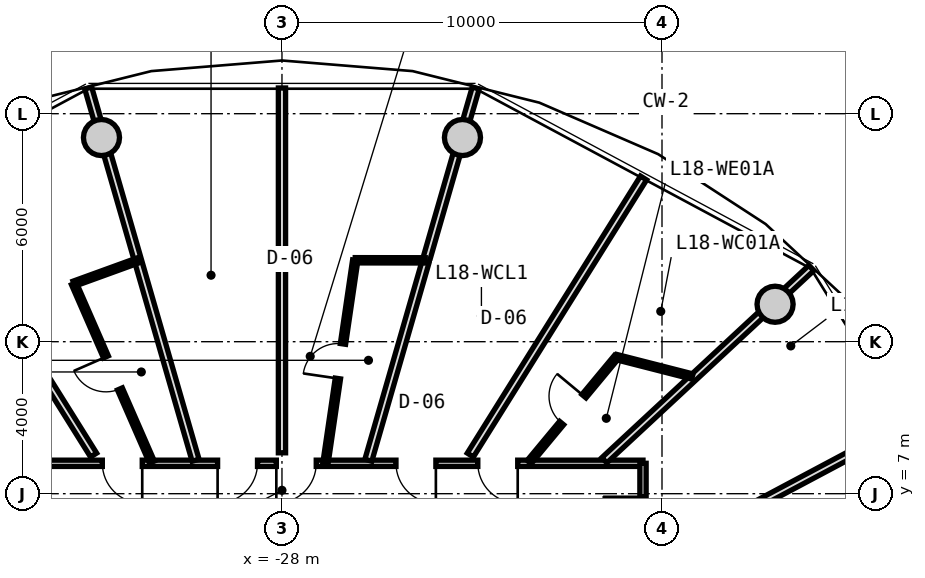
"""IFC4 building model, lengths in metres.
Left out: names, types, materials, properties, quantities, classifications, styles, units other than length and angle.
Written with IfcOpenShell. Run it as: python <this file> out.ifc"""

import sys

from ifc_helpers import new_model, si_unit, direction, frame, frame_2d, origin, origin_2d, place, context, subcontext, project, spatial, rectangle, circle, extrude, source, transform, mapped, element, fill, save


model = new_model("IFC4")
c1 = context("Model", 3, precision=1e-05, world=origin(), true_north=direction((0.0, 1.0)))
c2 = subcontext(c1, "Body", "Model", "MODEL_VIEW")
j1 = project(units=[si_unit("LENGTHUNIT", "METRE"), si_unit("PLANEANGLEUNIT", "RADIAN")], contexts=[c1])
p1 = place(None, origin())
s1 = spatial("IfcSite", under=j1, at=p1, CompositionType="ELEMENT")
p2 = place(p1, origin())
s2 = spatial("IfcBuilding", under=s1, at=p2, CompositionType="ELEMENT")
p3 = place(p2, frame((0.0, 0.0, 61.25)))
s3 = spatial("IfcBuildingStorey", under=s2, at=p3, CompositionType="ELEMENT", Elevation=61.25)
m1 = source(origin(), c2, "Body", "SweptSolid", [
    extrude(circle(Radius=0.475, at=origin_2d()), origin(), (0.0, 0.0, 1.0), 3.05),
])
for number, where, z_axis, x_axis in (
    (1, (-15.025, 11.985, 0.0), (0.0, 0.0, 1.0), (1.0, 0.0, 0.0)),
    (2, (-23.251, 16.373, 0.0), (0.0, 0.0, 1.0), (1.0, 0.0, 0.0)),
    (3, (-32.749, 16.373, 0.0), (0.0, 0.0, 1.0), (1.0, 0.0, 0.0)),
):
    element("IfcColumn", number, at=place(p3, frame(where, z_axis=z_axis, x_axis=x_axis)), inside=s3, PredefinedType="COLUMN", context=c2, shape_type="MappedRepresentation", body=[
        mapped(m1, transform((0.0, 0.0, 0.0), x_axis=(1.0, 0.0, 0.0), y_axis=(0.0, 1.0, 0.0), z_axis=(0.0, 0.0, 1.0), scale=1.0)),
    ])
m2 = source(origin(), c2, "Body", "SweptSolid", [
    extrude(rectangle(XDim=19.0, YDim=0.165, at=frame_2d((9.5, 0.0))), origin(), (0.0, 0.0, 1.0), 2.775),
])
p4 = place(p3, frame((-37.5, 7.8, 0.0), z_axis=(0.0, 0.0, 1.0), x_axis=(1.0, 0.0, 0.0)))
e4 = element("IfcWall", 4, at=p4, inside=s3, PredefinedType="PARTITIONING", context=c2, shape_type="MappedRepresentation", body=[
    mapped(m2, transform((0.0, 0.0, 0.0), x_axis=(1.0, 0.0, 0.0), y_axis=(0.0, 1.0, 0.0), z_axis=(0.0, 0.0, 1.0), scale=1.0)),
])
p5 = place(p4, frame((14.653, 0.0, 0.0)))
e5 = element("IfcOpeningElement", 5, at=p5, cuts=e4, PredefinedType="OPENING", context=c2, shape_type="SweptSolid", body=[
    extrude(rectangle(XDim=1.05, YDim=2.15, at=frame_2d((0.525, 1.075))), frame((0.0, 0.093, 0.0), z_axis=(0.0, -1.0, 0.0), x_axis=(1.0, 0.0, 0.0)), (0.0, 0.0, 1.0), 0.185),
])
p6 = place(p4, frame((12.5, 0.0, 0.0)))
e6 = element("IfcOpeningElement", 6, at=p6, cuts=e4, PredefinedType="OPENING", context=c2, shape_type="SweptSolid", body=[
    extrude(rectangle(XDim=1.05, YDim=2.15, at=frame_2d((0.525, 1.075))), frame((0.0, 0.093, 0.0), z_axis=(0.0, -1.0, 0.0), x_axis=(1.0, 0.0, 0.0)), (0.0, 0.0, 1.0), 0.185),
])
p7 = place(p4, frame((9.352, 0.0, 0.0)))
e7 = element("IfcOpeningElement", 7, at=p7, cuts=e4, PredefinedType="OPENING", context=c2, shape_type="SweptSolid", body=[
    extrude(rectangle(XDim=1.05, YDim=2.15, at=frame_2d((0.525, 1.075))), frame((0.0, 0.093, 0.0), z_axis=(0.0, -1.0, 0.0), x_axis=(1.0, 0.0, 0.0)), (0.0, 0.0, 1.0), 0.185),
])
p8 = place(p4, frame((7.806, 0.0, 0.0)))
e8 = element("IfcOpeningElement", 8, at=p8, cuts=e4, PredefinedType="OPENING", context=c2, shape_type="SweptSolid", body=[
    extrude(rectangle(XDim=1.05, YDim=2.15, at=frame_2d((0.525, 1.075))), frame((0.0, 0.093, 0.0), z_axis=(0.0, -1.0, 0.0), x_axis=(1.0, 0.0, 0.0)), (0.0, 0.0, 1.0), 0.185),
])
p9 = place(p4, frame((4.773, 0.0, 0.0)))
e9 = element("IfcOpeningElement", 9, at=p9, cuts=e4, PredefinedType="OPENING", context=c2, shape_type="SweptSolid", body=[
    extrude(rectangle(XDim=1.05, YDim=2.15, at=frame_2d((0.525, 1.075))), frame((0.0, 0.093, 0.0), z_axis=(0.0, -1.0, 0.0), x_axis=(1.0, 0.0, 0.0)), (0.0, 0.0, 1.0), 0.185),
])
p10 = place(p4, frame((2.251, 0.0, 0.0)))
e10 = element("IfcOpeningElement", 10, at=p10, cuts=e4, PredefinedType="OPENING", context=c2, shape_type="SweptSolid", body=[
    extrude(rectangle(XDim=1.05, YDim=2.15, at=frame_2d((0.525, 1.075))), frame((0.0, 0.093, 0.0), z_axis=(0.0, -1.0, 0.0), x_axis=(1.0, 0.0, 0.0)), (0.0, 0.0, 1.0), 0.185),
])
m3 = source(origin(), c2, "Body", "SweptSolid", [
    extrude(rectangle(XDim=15.6, YDim=0.165, at=frame_2d((7.8, 0.0))), origin(), (0.0, 0.0, 1.0), 2.775),
])
p11 = place(p3, frame((-18.5, 7.8, 0.0), z_axis=(0.0, 0.0, 1.0), x_axis=(0.0, -1.0, 0.0)))
e11 = element("IfcWall", 11, at=p11, inside=s3, PredefinedType="PARTITIONING", context=c2, shape_type="MappedRepresentation", body=[
    mapped(m3, transform((0.0, 0.0, 0.0), x_axis=(1.0, 0.0, 0.0), y_axis=(0.0, 1.0, 0.0), z_axis=(0.0, 0.0, 1.0), scale=1.0)),
])
p12 = place(p11, frame((12.141, 0.0, 0.0)))
e12 = element("IfcOpeningElement", 12, at=p12, cuts=e11, PredefinedType="OPENING", context=c2, shape_type="SweptSolid", body=[
    extrude(rectangle(XDim=1.25, YDim=2.2, at=frame_2d((0.625, 1.1))), frame((0.0, 0.093, 0.0), z_axis=(0.0, -1.0, 0.0), x_axis=(1.0, 0.0, 0.0)), (0.0, 0.0, 1.0), 0.185),
])
p13 = place(p11, frame((7.175, 0.0, 0.0)))
e13 = element("IfcOpeningElement", 13, at=p13, cuts=e11, PredefinedType="OPENING", context=c2, shape_type="SweptSolid", body=[
    extrude(rectangle(XDim=1.25, YDim=2.2, at=frame_2d((0.625, 1.1))), frame((0.0, 0.093, 0.0), z_axis=(0.0, -1.0, 0.0), x_axis=(1.0, 0.0, 0.0)), (0.0, 0.0, 1.0), 0.185),
])
p14 = place(p11, frame((2.826, 0.0, 0.0)))
e14 = element("IfcOpeningElement", 14, at=p14, cuts=e11, PredefinedType="OPENING", context=c2, shape_type="SweptSolid", body=[
    extrude(rectangle(XDim=1.05, YDim=2.15, at=frame_2d((0.525, 1.075))), frame((0.0, 0.093, 0.0), z_axis=(0.0, -1.0, 0.0), x_axis=(1.0, 0.0, 0.0)), (0.0, 0.0, 1.0), 0.185),
])
p15 = place(p11, frame((0.881, 0.0, 0.0)))
e15 = element("IfcOpeningElement", 15, at=p15, cuts=e11, PredefinedType="OPENING", context=c2, shape_type="SweptSolid", body=[
    extrude(rectangle(XDim=1.05, YDim=2.15, at=frame_2d((0.525, 1.075))), frame((0.0, 0.093, 0.0), z_axis=(0.0, -1.0, 0.0), x_axis=(1.0, 0.0, 0.0)), (0.0, 0.0, 1.0), 0.185),
])
m4 = source(origin(), c2, "Body", "SweptSolid", [
    extrude(rectangle(XDim=7.435, YDim=0.19, at=frame_2d((3.717, 0.0))), origin(), (0.0, 0.0, 1.0), 2.225),
])
p16 = place(p3, frame((-19.517, 7.88, 0.0), z_axis=(0.0, 0.0, 1.0), x_axis=(0.732651956848, 0.680603489652, 0.0)))
e16 = element("IfcWall", 16, at=p16, inside=s3, PredefinedType="PARTITIONING", context=c2, shape_type="MappedRepresentation", body=[
    mapped(m4, transform((0.0, 0.0, 0.0), x_axis=(1.0, 0.0, 0.0), y_axis=(0.0, 1.0, 0.0), z_axis=(0.0, 0.0, 1.0), scale=1.0)),
])
m5 = source(origin(), c2, "Body", "SweptSolid", [
    extrude(rectangle(XDim=7.677, YDim=0.19, at=frame_2d((3.838, 0.0))), origin(), (0.0, 0.0, 1.0), 2.775),
])
p17 = place(p3, frame((-18.297, 5.231, 0.0), z_axis=(0.0, 0.0, 1.0), x_axis=(0.882725057546, 0.469889851753, 0.0)))
e17 = element("IfcWall", 17, at=p17, inside=s3, PredefinedType="PARTITIONING", context=c2, shape_type="MappedRepresentation", body=[
    mapped(m5, transform((0.0, 0.0, 0.0), x_axis=(1.0, 0.0, 0.0), y_axis=(0.0, 1.0, 0.0), z_axis=(0.0, 0.0, 1.0), scale=1.0)),
])
m6 = source(origin(), c2, "Body", "SweptSolid", [
    extrude(rectangle(XDim=10.196, YDim=0.19, at=frame_2d((5.098, 0.0))), origin(), (0.0, 0.0, 1.0), 2.225),
])
p18 = place(p3, frame((-25.727, 7.88, 0.0), z_axis=(0.0, 0.0, 1.0), x_axis=(0.277136420347, 0.960830580549, 0.0)))
e18 = element("IfcWall", 18, at=p18, inside=s3, PredefinedType="PARTITIONING", context=c2, shape_type="MappedRepresentation", body=[
    mapped(m6, transform((0.0, 0.0, 0.0), x_axis=(1.0, 0.0, 0.0), y_axis=(0.0, 1.0, 0.0), z_axis=(0.0, 0.0, 1.0), scale=1.0)),
])
m7 = source(origin(), c2, "Body", "SweptSolid", [
    extrude(rectangle(XDim=8.598, YDim=0.19, at=frame_2d((4.299, 0.0))), origin(), (0.0, 0.0, 1.0), 2.775),
])
p19 = place(p3, frame((-23.043, 8.017, 0.0), z_axis=(0.0, 0.0, 1.0), x_axis=(0.530039776395, 0.847972779893, 0.0)))
e19 = element("IfcWall", 19, at=p19, inside=s3, PredefinedType="PARTITIONING", context=c2, shape_type="MappedRepresentation", body=[
    mapped(m7, transform((0.0, 0.0, 0.0), x_axis=(1.0, 0.0, 0.0), y_axis=(0.0, 1.0, 0.0), z_axis=(0.0, 0.0, 1.0), scale=1.0)),
])
m8 = source(origin(), c2, "Body", "SweptSolid", [
    extrude(rectangle(XDim=3.594, YDim=0.14, at=frame_2d((1.797, 0.0))), origin(), (0.0, 0.0, 1.0), 2.775),
])
p20 = place(p3, frame((-21.496, 7.83, 0.0), z_axis=(0.0, 0.0, 1.0), x_axis=(0.639001147083, 0.769205781326, 0.0)))
e20 = element("IfcWall", 20, at=p20, inside=s3, PredefinedType="PARTITIONING", context=c2, shape_type="MappedRepresentation", body=[
    mapped(m8, transform((0.0, 0.0, 0.0), x_axis=(1.0, 0.0, 0.0), y_axis=(0.0, 1.0, 0.0), z_axis=(0.0, 0.0, 1.0), scale=1.0)),
])
p21 = place(p20, frame((1.337, 0.0, 0.0)))
e21 = element("IfcOpeningElement", 21, at=p21, cuts=e20, PredefinedType="OPENING", context=c2, shape_type="SweptSolid", body=[
    extrude(rectangle(XDim=0.92, YDim=2.1, at=frame_2d((0.46, 1.05))), frame((0.0, 0.08, 0.0), z_axis=(0.0, -1.0, 0.0), x_axis=(1.0, 0.0, 0.0)), (0.0, 0.0, 1.0), 0.16),
])
m9 = source(origin(), c2, "Body", "SweptSolid", [
    extrude(rectangle(XDim=2.062, YDim=0.14, at=frame_2d((1.031, 0.0))), origin(), (0.0, 0.0, 1.0), 2.415),
])
p22 = place(p3, frame((-19.199, 10.595, 0.0), z_axis=(0.0, 0.0, 1.0), x_axis=(0.968776253543, -0.247936626121, 0.0)))
e22 = element("IfcWall", 22, at=p22, inside=s3, PredefinedType="PARTITIONING", context=c2, shape_type="MappedRepresentation", body=[
    mapped(m9, transform((0.0, 0.0, 0.0), x_axis=(1.0, 0.0, 0.0), y_axis=(0.0, 1.0, 0.0), z_axis=(0.0, 0.0, 1.0), scale=1.0)),
])
p23 = place(p3, frame((-30.273, 7.88, 0.0), z_axis=(0.0, 0.0, 1.0), x_axis=(-0.277136420347, 0.960830580549, 0.0)))
e23 = element("IfcWall", 23, at=p23, inside=s3, PredefinedType="PARTITIONING", context=c2, shape_type="MappedRepresentation", body=[
    mapped(m6, transform((0.0, 0.0, 0.0), x_axis=(1.0, 0.0, 0.0), y_axis=(0.0, 1.0, 0.0), z_axis=(0.0, 0.0, 1.0), scale=1.0)),
])
m10 = source(origin(), c2, "Body", "SweptSolid", [
    extrude(rectangle(XDim=9.601, YDim=0.19, at=frame_2d((4.8, 0.0))), origin(), (0.0, 0.0, 1.0), 2.775),
])
p24 = place(p3, frame((-28.0, 8.076, 0.0), z_axis=(0.0, 0.0, 1.0), x_axis=(0.0, 1.0, 0.0)))
e24 = element("IfcWall", 24, at=p24, inside=s3, PredefinedType="PARTITIONING", context=c2, shape_type="MappedRepresentation", body=[
    mapped(m10, transform((0.0, 0.0, 0.0), x_axis=(1.0, 0.0, 0.0), y_axis=(0.0, 1.0, 0.0), z_axis=(0.0, 0.0, 1.0), scale=1.0)),
])
m11 = source(origin(), c2, "Body", "SweptSolid", [
    extrude(rectangle(XDim=5.37, YDim=0.14, at=frame_2d((2.685, 0.0))), origin(), (0.0, 0.0, 1.0), 2.775),
])
p25 = place(p3, frame((-26.851, 7.83, 0.0), z_axis=(0.0, 0.0, 1.0), x_axis=(0.145131397853, 0.989412389935, 0.0)))
e25 = element("IfcWall", 25, at=p25, inside=s3, PredefinedType="PARTITIONING", context=c2, shape_type="MappedRepresentation", body=[
    mapped(m11, transform((0.0, 0.0, 0.0), x_axis=(1.0, 0.0, 0.0), y_axis=(0.0, 1.0, 0.0), z_axis=(0.0, 0.0, 1.0), scale=1.0)),
])
p26 = place(p25, frame((2.225, 0.0, 0.0)))
e26 = element("IfcOpeningElement", 26, at=p26, cuts=e25, PredefinedType="OPENING", context=c2, shape_type="SweptSolid", body=[
    extrude(rectangle(XDim=0.92, YDim=2.1, at=frame_2d((0.46, 1.05))), frame((0.0, 0.08, 0.0), z_axis=(0.0, -1.0, 0.0), x_axis=(1.0, 0.0, 0.0)), (0.0, 0.0, 1.0), 0.16),
])
m12 = source(origin(), c2, "Body", "SweptSolid", [
    extrude(rectangle(XDim=1.843, YDim=0.14, at=frame_2d((0.921, 0.0))), origin(), (0.0, 0.0, 1.0), 2.775),
])
p27 = place(p3, frame((-26.072, 13.143, 0.0), z_axis=(0.0, 0.0, 1.0), x_axis=(0.999998937801, -0.001457531246, 0.0)))
e27 = element("IfcWall", 27, at=p27, inside=s3, PredefinedType="PARTITIONING", context=c2, shape_type="MappedRepresentation", body=[
    mapped(m12, transform((0.0, 0.0, 0.0), x_axis=(1.0, 0.0, 0.0), y_axis=(0.0, 1.0, 0.0), z_axis=(0.0, 0.0, 1.0), scale=1.0)),
])
p28 = place(p3, frame((-32.957, 8.017, 0.0), z_axis=(0.0, 0.0, 1.0), x_axis=(-0.530039776395, 0.847972779893, 0.0)))
e28 = element("IfcWall", 28, at=p28, inside=s3, PredefinedType="PARTITIONING", context=c2, shape_type="MappedRepresentation", body=[
    mapped(m7, transform((0.0, 0.0, 0.0), x_axis=(1.0, 0.0, 0.0), y_axis=(0.0, 1.0, 0.0), z_axis=(0.0, 0.0, 1.0), scale=1.0)),
])
m13 = source(origin(), c2, "Body", "SweptSolid", [
    extrude(rectangle(XDim=5.126, YDim=0.14, at=frame_2d((2.563, 0.0))), origin(), (0.0, 0.0, 1.0), 2.775),
])
p29 = place(p3, frame((-31.422, 7.83, 0.0), z_axis=(0.0, 0.0, 1.0), x_axis=(-0.400473994842, 0.916308124735, 0.0)))
e29 = element("IfcWall", 29, at=p29, inside=s3, PredefinedType="PARTITIONING", context=c2, shape_type="MappedRepresentation", body=[
    mapped(m13, transform((0.0, 0.0, 0.0), x_axis=(1.0, 0.0, 0.0), y_axis=(0.0, 1.0, 0.0), z_axis=(0.0, 0.0, 1.0), scale=1.0)),
])
p30 = place(p29, frame((2.103, 0.0, 0.0)))
e30 = element("IfcOpeningElement", 30, at=p30, cuts=e29, PredefinedType="OPENING", context=c2, shape_type="SweptSolid", body=[
    extrude(rectangle(XDim=0.92, YDim=2.1, at=frame_2d((0.46, 1.05))), frame((0.0, 0.08, 0.0), z_axis=(0.0, -1.0, 0.0), x_axis=(1.0, 0.0, 0.0)), (0.0, 0.0, 1.0), 0.16),
])
m14 = source(origin(), c2, "Body", "SweptSolid", [
    extrude(rectangle(XDim=1.811, YDim=0.14, at=frame_2d((0.906, 0.0))), origin(), (0.0, 0.0, 1.0), 2.775),
])
p31 = place(p3, frame((-33.475, 12.527, 0.0), z_axis=(0.0, 0.0, 1.0), x_axis=(0.940009682452, 0.341147764021, 0.0)))
e31 = element("IfcWall", 31, at=p31, inside=s3, PredefinedType="PARTITIONING", context=c2, shape_type="MappedRepresentation", body=[
    mapped(m14, transform((0.0, 0.0, 0.0), x_axis=(1.0, 0.0, 0.0), y_axis=(0.0, 1.0, 0.0), z_axis=(0.0, 0.0, 1.0), scale=1.0)),
])
m15 = source(origin(), c2, "Body", "SweptSolid", [
    extrude(rectangle(XDim=1.05, YDim=2.15, at=frame_2d((0.525, 1.075))), frame((0.0, 0.025, 0.0), z_axis=(0.0, -1.0, 0.0), x_axis=(1.0, 0.0, 0.0)), (0.0, 0.0, 1.0), 0.05),
])
p32 = place(p15, frame((1.05, 0.0, 0.0), z_axis=(0.0, 0.0, 1.0), x_axis=(-1.0, 0.0, 0.0)))
e32 = element("IfcDoor", 32, at=p32, inside=s3, OperationType="SINGLE_SWING_RIGHT", PredefinedType="DOOR", context=c2, shape_type="MappedRepresentation", body=[
    mapped(m15, transform((0.0, 0.0, 0.0), x_axis=(1.0, 0.0, 0.0), y_axis=(0.0, 1.0, 0.0), z_axis=(0.0, 0.0, 1.0), scale=1.0)),
])
fill(e15, e32)
p33 = place(p5, frame((1.05, 0.0, 0.0), z_axis=(0.0, 0.0, 1.0), x_axis=(-1.0, 0.0, 0.0)))
e33 = element("IfcDoor", 33, at=p33, inside=s3, OperationType="SINGLE_SWING_LEFT", PredefinedType="DOOR", context=c2, shape_type="MappedRepresentation", body=[
    mapped(m15, transform((0.0, 0.0, 0.0), x_axis=(1.0, 0.0, 0.0), y_axis=(0.0, 1.0, 0.0), z_axis=(0.0, 0.0, 1.0), scale=1.0)),
])
fill(e5, e33)
m16 = source(origin(), c2, "Body", "SweptSolid", [
    extrude(rectangle(XDim=0.92, YDim=2.1, at=frame_2d((0.46, 1.05))), frame((0.0, 0.025, 0.0), z_axis=(0.0, -1.0, 0.0), x_axis=(1.0, 0.0, 0.0)), (0.0, 0.0, 1.0), 0.05),
])
p34 = place(p21, origin())
e34 = element("IfcDoor", 34, at=p34, inside=s3, OperationType="SINGLE_SWING_RIGHT", PredefinedType="DOOR", context=c2, shape_type="MappedRepresentation", body=[
    mapped(m16, transform((0.0, 0.0, 0.0), x_axis=(1.0, 0.0, 0.0), y_axis=(0.0, 1.0, 0.0), z_axis=(0.0, 0.0, 1.0), scale=1.0)),
])
fill(e21, e34)
p35 = place(p6, frame((1.05, 0.0, 0.0), z_axis=(0.0, 0.0, 1.0), x_axis=(-1.0, 0.0, 0.0)))
e35 = element("IfcDoor", 35, at=p35, inside=s3, OperationType="SINGLE_SWING_LEFT", PredefinedType="DOOR", context=c2, shape_type="MappedRepresentation", body=[
    mapped(m15, transform((0.0, 0.0, 0.0), x_axis=(1.0, 0.0, 0.0), y_axis=(0.0, 1.0, 0.0), z_axis=(0.0, 0.0, 1.0), scale=1.0)),
])
fill(e6, e35)
p36 = place(p7, frame((1.05, 0.0, 0.0), z_axis=(0.0, 0.0, 1.0), x_axis=(-1.0, 0.0, 0.0)))
e36 = element("IfcDoor", 36, at=p36, inside=s3, OperationType="SINGLE_SWING_RIGHT", PredefinedType="DOOR", context=c2, shape_type="MappedRepresentation", body=[
    mapped(m15, transform((0.0, 0.0, 0.0), x_axis=(1.0, 0.0, 0.0), y_axis=(0.0, 1.0, 0.0), z_axis=(0.0, 0.0, 1.0), scale=1.0)),
])
fill(e7, e36)
p37 = place(p26, origin())
e37 = element("IfcDoor", 37, at=p37, inside=s3, OperationType="SINGLE_SWING_LEFT", PredefinedType="DOOR", context=c2, shape_type="MappedRepresentation", body=[
    mapped(m16, transform((0.0, 0.0, 0.0), x_axis=(1.0, 0.0, 0.0), y_axis=(0.0, 1.0, 0.0), z_axis=(0.0, 0.0, 1.0), scale=1.0)),
])
fill(e26, e37)
p38 = place(p8, frame((1.05, 0.0, 0.0), z_axis=(0.0, 0.0, 1.0), x_axis=(-1.0, 0.0, 0.0)))
e38 = element("IfcDoor", 38, at=p38, inside=s3, OperationType="SINGLE_SWING_RIGHT", PredefinedType="DOOR", context=c2, shape_type="MappedRepresentation", body=[
    mapped(m15, transform((0.0, 0.0, 0.0), x_axis=(1.0, 0.0, 0.0), y_axis=(0.0, 1.0, 0.0), z_axis=(0.0, 0.0, 1.0), scale=1.0)),
])
fill(e8, e38)
p39 = place(p9, frame((1.05, 0.0, 0.0), z_axis=(0.0, 0.0, 1.0), x_axis=(-1.0, 0.0, 0.0)))
e39 = element("IfcDoor", 39, at=p39, inside=s3, OperationType="SINGLE_SWING_LEFT", PredefinedType="DOOR", context=c2, shape_type="MappedRepresentation", body=[
    mapped(m15, transform((0.0, 0.0, 0.0), x_axis=(1.0, 0.0, 0.0), y_axis=(0.0, 1.0, 0.0), z_axis=(0.0, 0.0, 1.0), scale=1.0)),
])
fill(e9, e39)
p40 = place(p30, origin())
e40 = element("IfcDoor", 40, at=p40, inside=s3, OperationType="SINGLE_SWING_RIGHT", PredefinedType="DOOR", context=c2, shape_type="MappedRepresentation", body=[
    mapped(m16, transform((0.0, 0.0, 0.0), x_axis=(1.0, 0.0, 0.0), y_axis=(0.0, 1.0, 0.0), z_axis=(0.0, 0.0, 1.0), scale=1.0)),
])
fill(e30, e40)
save(model, sys.argv[1])
